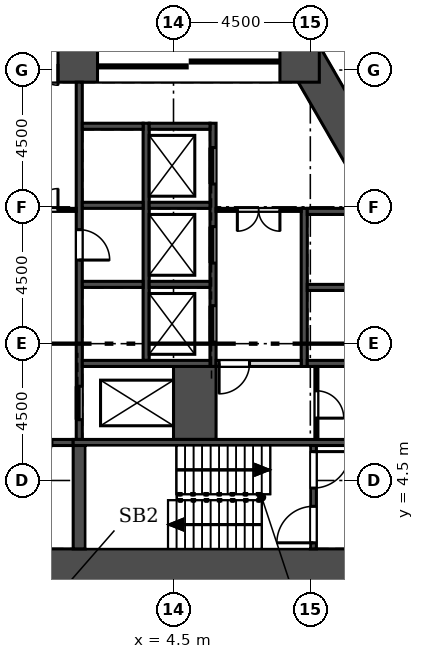
"""IFC4 building model, lengths in metres.
Left out: names, types, materials, properties, quantities, classifications, styles, units other than length and angle.
Written with IfcOpenShell. Run it as: python <this file> out.ifc"""

import sys

from ifc_helpers import new_model, si_unit, direction, frame, frame_2d, origin, place, context, subcontext, project, spatial, rectangle, extrude, element, fill, save


model = new_model("IFC4")
c1 = context("Model", 3, precision=1e-05, world=origin(), true_north=direction((0.0, 1.0)))
c2 = subcontext(c1, "Body", "Model", "MODEL_VIEW")
j1 = project(units=[si_unit("LENGTHUNIT", "METRE"), si_unit("PLANEANGLEUNIT", "RADIAN")], contexts=[c1])
p1 = place(None, origin())
s1 = spatial("IfcSite", under=j1, at=p1, CompositionType="ELEMENT")
p2 = place(p1, origin())
s2 = spatial("IfcBuilding", under=s1, at=p2, CompositionType="ELEMENT")
p3 = place(p2, frame((0.0, 0.0, 174.9)))
s3 = spatial("IfcBuildingStorey", under=s2, at=p3, CompositionType="ELEMENT", Elevation=174.9)
p4 = place(p3, frame((-13.8, 1.65, 0.0), z_axis=(0.0, 0.0, 1.0), x_axis=(1.0, 0.0, 0.0)))
e1 = element("IfcWall", 1, at=p4, inside=s3, PredefinedType="SHEAR", context=c2, shape_type="SweptSolid", body=[
    extrude(rectangle(XDim=27.6, YDim=1.2, at=frame_2d((13.8, 0.0))), origin(), (0.0, 0.0, 1.0), 7.2),
])
p5 = place(p3, frame((13.281, 10.699, 0.0), z_axis=(0.0, 0.0, 1.0), x_axis=(-0.499998513025, 0.866026262288, 0.0)))
e2 = element("IfcWall", 2, at=p5, inside=s3, PredefinedType="SHEAR", context=c2, shape_type="SweptSolid", body=[
    extrude(rectangle(XDim=9.008, YDim=1.2, at=frame_2d((4.504, 0.0))), origin(), (0.0, 0.0, 1.0), 7.2),
])
p6 = place(p3, frame((9.296, 18.2, 0.0), z_axis=(0.0, 0.0, 1.0), x_axis=(-1.0, 0.0, 0.0)))
e3 = element("IfcWall", 3, at=p6, inside=s3, PredefinedType="SHEAR", context=c2, shape_type="SweptSolid", body=[
    extrude(rectangle(XDim=18.592, YDim=1.2, at=frame_2d((9.296, 0.0))), origin(), (0.0, 0.0, 1.0), 7.2),
])
p7 = place(p6, frame((8.596, 0.0, 0.0)))
e4 = element("IfcOpeningElement", 4, at=p7, cuts=e3, PredefinedType="OPENING", context=c2, shape_type="SweptSolid", body=[
    extrude(rectangle(XDim=1.4, YDim=2.1, at=frame_2d((0.7, 1.05))), frame((0.0, 0.61, 0.0), z_axis=(0.0, -1.0, 0.0), x_axis=(1.0, 0.0, 0.0)), (0.0, 0.0, 1.0), 1.22),
])
p8 = place(p6, frame((11.296, 0.0, 0.0)))
e5 = element("IfcOpeningElement", 5, at=p8, cuts=e3, PredefinedType="OPENING", context=c2, shape_type="SweptSolid", body=[
    extrude(rectangle(XDim=6.0, YDim=2.4, at=frame_2d((3.0, 1.2))), frame((0.0, 0.61, 0.0), z_axis=(0.0, -1.0, 0.0), x_axis=(1.0, 0.0, 0.0)), (0.0, 0.0, 1.0), 1.22),
])
p9 = place(p6, frame((1.296, 0.0, 0.0)))
e6 = element("IfcOpeningElement", 6, at=p9, cuts=e3, PredefinedType="OPENING", context=c2, shape_type="SweptSolid", body=[
    extrude(rectangle(XDim=6.0, YDim=2.4, at=frame_2d((3.0, 1.2))), frame((0.0, 0.61, 0.0), z_axis=(0.0, -1.0, 0.0), x_axis=(1.0, 0.0, 0.0)), (0.0, 0.0, 1.0), 1.22),
])
p10 = place(p3, frame((28.257, 7.709, 0.0), z_axis=(0.0, 0.0, 1.0), x_axis=(-0.500002420408, 0.866024006357, 0.0)))
e7 = element("IfcWall", 7, at=p10, inside=s3, PredefinedType="SOLIDWALL", context=c2, shape_type="SweptSolid", body=[
    extrude(rectangle(XDim=47.807, YDim=0.34, at=frame_2d((23.904, 0.0))), origin(), (0.0, 0.0, 1.0), 6.8),
])
p11 = place(p10, frame((32.452, 0.0, 0.9)))
e8 = element("IfcOpeningElement", 8, at=p11, cuts=e7, PredefinedType="OPENING", context=c2, shape_type="SweptSolid", body=[
    extrude(rectangle(XDim=1.885, YDim=3.0, at=frame_2d((0.942, 1.5))), frame((0.0, 0.18, 0.0), z_axis=(0.0, -1.0, 0.0), x_axis=(1.0, 0.0, 0.0)), (0.0, 0.0, 1.0), 0.36),
])
p12 = place(p10, frame((38.452, 0.0, 0.9)))
e9 = element("IfcOpeningElement", 9, at=p12, cuts=e7, PredefinedType="OPENING", context=c2, shape_type="SweptSolid", body=[
    extrude(rectangle(XDim=1.885, YDim=3.0, at=frame_2d((0.942, 1.5))), frame((0.0, 0.18, 0.0), z_axis=(0.0, -1.0, 0.0), x_axis=(1.0, 0.0, 0.0)), (0.0, 0.0, 1.0), 0.36),
])
p13 = place(p10, frame((44.452, 0.0, 0.9)))
e10 = element("IfcOpeningElement", 10, at=p13, cuts=e7, PredefinedType="OPENING", context=c2, shape_type="SweptSolid", body=[
    extrude(rectangle(XDim=1.885, YDim=3.0, at=frame_2d((0.942, 1.5))), frame((0.0, 0.18, 0.0), z_axis=(0.0, -1.0, 0.0), x_axis=(1.0, 0.0, 0.0)), (0.0, 0.0, 1.0), 0.36),
])
p14 = place(p3, frame((8.8, 8.25, -0.4), z_axis=(0.0, 0.0, 1.0), x_axis=(0.0, 1.0, 0.0)))
e11 = element("IfcWall", 11, at=p14, inside=s3, PredefinedType="SOLIDWALL", context=c2, shape_type="SweptSolid", body=[
    extrude(rectangle(XDim=5.2, YDim=0.2, at=frame_2d((2.6, 0.0))), origin(), (0.0, 0.0, 1.0), 7.2),
])
p15 = place(p3, frame((5.8, 8.25, -0.4), z_axis=(0.0, 0.0, 1.0), x_axis=(0.0, 1.0, 0.0)))
e12 = element("IfcWall", 12, at=p15, inside=s3, PredefinedType="SOLIDWALL", context=c2, shape_type="SweptSolid", body=[
    extrude(rectangle(XDim=8.0, YDim=0.2, at=frame_2d((4.0, 0.0))), origin(), (0.0, 0.0, 1.0), 7.2),
])
p16 = place(p15, frame((0.8, 0.0, 0.4)))
e13 = element("IfcOpeningElement", 13, at=p16, cuts=e12, PredefinedType="OPENING", context=c2, shape_type="SweptSolid", body=[
    extrude(rectangle(XDim=1.2, YDim=2.1, at=frame_2d((0.6, 1.05))), frame((0.0, 0.11, 0.0), z_axis=(0.0, -1.0, 0.0), x_axis=(1.0, 0.0, 0.0)), (0.0, 0.0, 1.0), 0.22),
])
p17 = place(p15, frame((3.4, 0.0, 0.4)))
e14 = element("IfcOpeningElement", 14, at=p17, cuts=e12, PredefinedType="OPENING", context=c2, shape_type="SweptSolid", body=[
    extrude(rectangle(XDim=1.2, YDim=2.1, at=frame_2d((0.6, 1.05))), frame((0.0, 0.11, 0.0), z_axis=(0.0, -1.0, 0.0), x_axis=(1.0, 0.0, 0.0)), (0.0, 0.0, 1.0), 0.22),
])
p18 = place(p15, frame((6.0, 0.0, 0.4)))
e15 = element("IfcOpeningElement", 15, at=p18, cuts=e12, PredefinedType="OPENING", context=c2, shape_type="SweptSolid", body=[
    extrude(rectangle(XDim=1.2, YDim=2.1, at=frame_2d((0.6, 1.05))), frame((0.0, 0.11, 0.0), z_axis=(0.0, -1.0, 0.0), x_axis=(1.0, 0.0, 0.0)), (0.0, 0.0, 1.0), 0.22),
])
p19 = place(p3, frame((3.6, 8.45, -0.4), z_axis=(0.0, 0.0, 1.0), x_axis=(0.0, 1.0, 0.0)))
e16 = element("IfcWall", 16, at=p19, inside=s3, PredefinedType="SOLIDWALL", context=c2, shape_type="SweptSolid", body=[
    extrude(rectangle(XDim=7.8, YDim=0.2, at=frame_2d((3.9, 0.0))), origin(), (0.0, 0.0, 1.0), 7.2),
])
p20 = place(p3, frame((1.4, 5.85, -0.4), z_axis=(0.0, 0.0, 1.0), x_axis=(0.0, 1.0, 0.0)))
e17 = element("IfcWall", 17, at=p20, inside=s3, PredefinedType="SOLIDWALL", context=c2, shape_type="SweptSolid", body=[
    extrude(rectangle(XDim=11.75, YDim=0.2, at=frame_2d((5.875, 0.0))), origin(), (0.0, 0.0, 1.0), 7.2),
])
p21 = place(p20, frame((0.65, 0.0, 0.4)))
e18 = element("IfcOpeningElement", 18, at=p21, cuts=e17, PredefinedType="OPENING", context=c2, shape_type="SweptSolid", body=[
    extrude(rectangle(XDim=1.1, YDim=2.1, at=frame_2d((0.55, 1.05))), frame((0.0, 0.11, 0.0), z_axis=(0.0, -1.0, 0.0), x_axis=(1.0, 0.0, 0.0)), (0.0, 0.0, 1.0), 0.22),
])
p22 = place(p20, frame((5.9, 0.0, 0.4)))
e19 = element("IfcOpeningElement", 19, at=p22, cuts=e17, PredefinedType="OPENING", context=c2, shape_type="SweptSolid", body=[
    extrude(rectangle(XDim=1.0, YDim=2.1, at=frame_2d((0.5, 1.05))), frame((0.0, 0.11, 0.0), z_axis=(0.0, -1.0, 0.0), x_axis=(1.0, 0.0, 0.0)), (0.0, 0.0, 1.0), 0.22),
])
p23 = place(p3, frame((5.2, 5.85, -0.4), z_axis=(0.0, 0.0, 1.0), x_axis=(0.0, 1.0, 0.0)))
e20 = element("IfcWall", 20, at=p23, inside=s3, PredefinedType="SOLIDWALL", context=c2, shape_type="SweptSolid", body=[
    extrude(rectangle(XDim=2.4, YDim=1.4, at=frame_2d((1.2, 0.0))), origin(), (0.0, 0.0, 1.0), 7.2),
])
p24 = place(p3, frame((8.9, 8.35, -0.4), z_axis=(0.0, 0.0, 1.0), x_axis=(1.0, 0.0, 0.0)))
e21 = element("IfcWall", 21, at=p24, inside=s3, PredefinedType="SOLIDWALL", context=c2, shape_type="SweptSolid", body=[
    extrude(rectangle(XDim=2.0, YDim=0.2, at=frame_2d((1.0, 0.0))), origin(), (0.0, 0.0, 1.0), 7.2),
])
p25 = place(p3, frame((1.5, 8.35, -0.4), z_axis=(0.0, 0.0, 1.0), x_axis=(1.0, 0.0, 0.0)))
e22 = element("IfcWall", 22, at=p25, inside=s3, PredefinedType="SOLIDWALL", context=c2, shape_type="SweptSolid", body=[
    extrude(rectangle(XDim=4.2, YDim=0.2, at=frame_2d((2.1, 0.0))), origin(), (0.0, 0.0, 1.0), 7.2),
])
p26 = place(p3, frame((-1.2, 5.75, -0.4), z_axis=(0.0, 0.0, 1.0), x_axis=(1.0, 0.0, 0.0)))
e23 = element("IfcWall", 23, at=p26, inside=s3, PredefinedType="SOLIDWALL", context=c2, shape_type="SweptSolid", body=[
    extrude(rectangle(XDim=2.4, YDim=0.2, at=frame_2d((1.2, 0.0))), origin(), (0.0, 0.0, 1.0), 7.2),
])
p27 = place(p26, frame((0.7, 0.0, 0.4)))
e24 = element("IfcOpeningElement", 24, at=p27, cuts=e23, PredefinedType="OPENING", context=c2, shape_type="SweptSolid", body=[
    extrude(rectangle(XDim=1.0, YDim=2.1, at=frame_2d((0.5, 1.05))), frame((0.0, 0.11, 0.0), z_axis=(0.0, -1.0, 0.0), x_axis=(1.0, 0.0, 0.0)), (0.0, 0.0, 1.0), 0.22),
])
p28 = place(p3, frame((1.2, 5.75, -0.4), z_axis=(0.0, 0.0, 1.0), x_axis=(1.0, 0.0, 0.0)))
e25 = element("IfcWall", 25, at=p28, inside=s3, PredefinedType="SOLIDWALL", context=c2, shape_type="SweptSolid", body=[
    extrude(rectangle(XDim=11.4, YDim=0.2, at=frame_2d((5.7, 0.0))), origin(), (0.0, 0.0, 1.0), 7.2),
])
p29 = place(p3, frame((9.1, 2.25, -0.4), z_axis=(0.0, 0.0, 1.0), x_axis=(0.0, 1.0, 0.0)))
e26 = element("IfcWall", 26, at=p29, inside=s3, PredefinedType="SOLIDWALL", context=c2, shape_type="SweptSolid", body=[
    extrude(rectangle(XDim=3.4, YDim=0.2, at=frame_2d((1.7, 0.0))), origin(), (0.0, 0.0, 1.0), 7.2),
])
p30 = place(p29, frame((0.2, 0.0, 0.4)))
e27 = element("IfcOpeningElement", 27, at=p30, cuts=e26, PredefinedType="OPENING", context=c2, shape_type="SweptSolid", body=[
    extrude(rectangle(XDim=1.2, YDim=2.1, at=frame_2d((0.6, 1.05))), frame((0.0, 0.11, 0.0), z_axis=(0.0, -1.0, 0.0), x_axis=(1.0, 0.0, 0.0)), (0.0, 0.0, 1.0), 0.22),
])
p31 = place(p29, frame((2.0, 0.0, 0.4)))
e28 = element("IfcOpeningElement", 28, at=p31, cuts=e26, PredefinedType="OPENING", context=c2, shape_type="SweptSolid", body=[
    extrude(rectangle(XDim=1.2, YDim=2.1, at=frame_2d((0.6, 1.05))), frame((0.0, 0.11, 0.0), z_axis=(0.0, -1.0, 0.0), x_axis=(1.0, 0.0, 0.0)), (0.0, 0.0, 1.0), 0.22),
])
p32 = place(p3, frame((1.4, 2.25, -0.4), z_axis=(0.0, 0.0, 1.0), x_axis=(0.0, 1.0, 0.0)))
e29 = element("IfcWall", 29, at=p32, inside=s3, PredefinedType="SOLIDWALL", context=c2, shape_type="SweptSolid", body=[
    extrude(rectangle(XDim=3.4, YDim=0.4, at=frame_2d((1.7, 0.0))), origin(), (0.0, 0.0, 1.0), 7.2),
])
for number, where, z_axis, x_axis in (
    (30, (8.9, 10.85, -0.4), (0.0, 0.0, 1.0), (1.0, 0.0, 0.0)),
    (31, (8.9, 13.35, -0.4), (0.0, 0.0, 1.0), (1.0, 0.0, 0.0)),
    (32, (3.7, 10.95, -0.4), (0.0, 0.0, 1.0), (1.0, 0.0, 0.0)),
    (33, (3.7, 13.55, -0.4), (0.0, 0.0, 1.0), (1.0, 0.0, 0.0)),
    (34, (3.7, 16.15, -0.4), (0.0, 0.0, 1.0), (1.0, 0.0, 0.0)),
    (35, (1.5, 10.95, -0.4), (0.0, 0.0, 1.0), (1.0, 0.0, 0.0)),
    (36, (1.5, 13.55, -0.4), (0.0, 0.0, 1.0), (1.0, 0.0, 0.0)),
    (37, (1.5, 16.15, -0.4), (0.0, 0.0, 1.0), (1.0, 0.0, 0.0)),
):
    element("IfcWall", number, at=place(p3, frame(where, z_axis=z_axis, x_axis=x_axis)), inside=s3, PredefinedType="SOLIDWALL", context=c2, shape_type="SweptSolid", body=[
        extrude(rectangle(XDim=2.0, YDim=0.2, at=frame_2d((1.0, 0.0))), origin(), (0.0, 0.0, 1.0), 7.2),
    ])
p33 = place(p3, frame((5.9, 13.4, 0.0), z_axis=(0.0, 0.0, 1.0), x_axis=(1.0, 0.0, 0.0)))
e38 = element("IfcWall", 38, at=p33, inside=s3, PredefinedType="PARTITIONING", context=c2, shape_type="SweptSolid", body=[
    extrude(rectangle(XDim=2.8, YDim=0.1, at=frame_2d((1.4, 0.0))), origin(), (0.0, 0.0, 1.0), 6.8),
])
p34 = place(p33, frame((0.7, 0.0, 0.0)))
e39 = element("IfcOpeningElement", 39, at=p34, cuts=e38, PredefinedType="OPENING", context=c2, shape_type="SweptSolid", body=[
    extrude(rectangle(XDim=1.4, YDim=2.1, at=frame_2d((0.7, 1.05))), frame((0.0, 0.06, 0.0), z_axis=(0.0, -1.0, 0.0), x_axis=(1.0, 0.0, 0.0)), (0.0, 0.0, 1.0), 0.12),
])
p35 = place(p3, frame((9.2, 5.85, 0.0), z_axis=(0.0, 0.0, 1.0), x_axis=(0.0, 1.0, 0.0)))
e40 = element("IfcWall", 40, at=p35, inside=s3, PredefinedType="PARTITIONING", context=c2, shape_type="SweptSolid", body=[
    extrude(rectangle(XDim=2.4, YDim=0.1, at=frame_2d((1.2, 0.0))), origin(), (0.0, 0.0, 1.0), 6.8),
])
p36 = place(p35, frame((0.7, 0.0, 0.0)))
e41 = element("IfcOpeningElement", 41, at=p36, cuts=e40, PredefinedType="OPENING", context=c2, shape_type="SweptSolid", body=[
    extrude(rectangle(XDim=0.9, YDim=2.1, at=frame_2d((0.45, 1.05))), frame((0.0, 0.06, 0.0), z_axis=(0.0, -1.0, 0.0), x_axis=(1.0, 0.0, 0.0)), (0.0, 0.0, 1.0), 0.12),
])
p37 = place(p3, frame((5.9, 8.35, 0.0), z_axis=(0.0, 0.0, 1.0), x_axis=(1.0, 0.0, 0.0)))
e42 = element("IfcWall", 42, at=p37, inside=s3, PredefinedType="SOLIDWALL", context=c2, shape_type="SweptSolid", body=[
    extrude(rectangle(XDim=2.8, YDim=0.2, at=frame_2d((1.4, 0.0))), origin(), (0.0, 0.0, 1.0), 6.8),
])
p38 = place(p37, frame((0.1, 0.0, 0.0)))
e43 = element("IfcOpeningElement", 43, at=p38, cuts=e42, PredefinedType="OPENING", context=c2, shape_type="SweptSolid", body=[
    extrude(rectangle(XDim=1.0, YDim=2.1, at=frame_2d((0.5, 1.05))), frame((0.0, 0.11, 0.0), z_axis=(0.0, -1.0, 0.0), x_axis=(1.0, 0.0, 0.0)), (0.0, 0.0, 1.0), 0.22),
])
p39 = place(p3, frame((-1.3, 13.4, 0.0), z_axis=(0.0, 0.0, 1.0), x_axis=(1.0, 0.0, 0.0)))
e44 = element("IfcWall", 44, at=p39, inside=s3, PredefinedType="PARTITIONING", context=c2, shape_type="SweptSolid", body=[
    extrude(rectangle(XDim=2.6, YDim=0.1, at=frame_2d((1.3, 0.0))), origin(), (0.0, 0.0, 1.0), 6.8),
])
p40 = place(p39, frame((0.6, 0.0, 0.0)))
e45 = element("IfcOpeningElement", 45, at=p40, cuts=e44, PredefinedType="OPENING", context=c2, shape_type="SweptSolid", body=[
    extrude(rectangle(XDim=1.4, YDim=2.1, at=frame_2d((0.7, 1.05))), frame((0.0, 0.06, 0.0), z_axis=(0.0, -1.0, 0.0), x_axis=(1.0, 0.0, 0.0)), (0.0, 0.0, 1.0), 0.12),
])
p41 = place(p3, frame((7.4, 3.95, 0.0), z_axis=(0.0, 0.0, 1.0), x_axis=(1.0, 0.0, 0.0)))
e46 = element("IfcWall", 46, at=p41, inside=s3, PredefinedType="SOLIDWALL", context=c2, shape_type="SweptSolid", body=[
    extrude(rectangle(XDim=1.6, YDim=0.2, at=frame_2d((0.8, 0.0))), origin(), (0.0, 0.0, 1.0), 6.8),
])
p42 = place(p16, origin())
e47 = element("IfcDoor", 47, at=p42, inside=s3, OperationType="SLIDING_TO_LEFT", PredefinedType="DOOR", context=c2, shape_type="SweptSolid", body=[
    extrude(rectangle(XDim=1.2, YDim=2.1, at=frame_2d((0.6, 1.05))), frame((0.0, 0.025, 0.0), z_axis=(0.0, -1.0, 0.0), x_axis=(1.0, 0.0, 0.0)), (0.0, 0.0, 1.0), 0.05),
])
fill(e13, e47)
p43 = place(p17, origin())
e48 = element("IfcDoor", 48, at=p43, inside=s3, OperationType="SLIDING_TO_LEFT", PredefinedType="DOOR", context=c2, shape_type="SweptSolid", body=[
    extrude(rectangle(XDim=1.2, YDim=2.1, at=frame_2d((0.6, 1.05))), frame((0.0, 0.025, 0.0), z_axis=(0.0, -1.0, 0.0), x_axis=(1.0, 0.0, 0.0)), (0.0, 0.0, 1.0), 0.05),
])
fill(e14, e48)
p44 = place(p18, origin())
e49 = element("IfcDoor", 49, at=p44, inside=s3, OperationType="SLIDING_TO_LEFT", PredefinedType="DOOR", context=c2, shape_type="SweptSolid", body=[
    extrude(rectangle(XDim=1.2, YDim=2.1, at=frame_2d((0.6, 1.05))), frame((0.0, 0.025, 0.0), z_axis=(0.0, -1.0, 0.0), x_axis=(1.0, 0.0, 0.0)), (0.0, 0.0, 1.0), 0.05),
])
fill(e15, e49)
p45 = place(p21, origin())
e50 = element("IfcDoor", 50, at=p45, inside=s3, OperationType="SLIDING_TO_RIGHT", PredefinedType="DOOR", context=c2, shape_type="SweptSolid", body=[
    extrude(rectangle(XDim=1.1, YDim=2.1, at=frame_2d((0.55, 1.05))), frame((0.0, 0.025, 0.0), z_axis=(0.0, -1.0, 0.0), x_axis=(1.0, 0.0, 0.0)), (0.0, 0.0, 1.0), 0.05),
])
fill(e18, e50)
p46 = place(p22, frame((1.0, 0.0, 0.0), z_axis=(0.0, 0.0, 1.0), x_axis=(-1.0, 0.0, 0.0)))
e51 = element("IfcDoor", 51, at=p46, inside=s3, OperationType="SINGLE_SWING_RIGHT", PredefinedType="DOOR", context=c2, shape_type="SweptSolid", body=[
    extrude(rectangle(XDim=1.0, YDim=2.1, at=frame_2d((0.5, 1.05))), frame((0.0, 0.025, 0.0), z_axis=(0.0, -1.0, 0.0), x_axis=(1.0, 0.0, 0.0)), (0.0, 0.0, 1.0), 0.05),
])
fill(e19, e51)
p47 = place(p34, frame((1.4, 0.0, 0.0), z_axis=(0.0, 0.0, 1.0), x_axis=(-1.0, 0.0, 0.0)))
e52 = element("IfcDoor", 52, at=p47, inside=s3, OperationType="DOUBLE_DOOR_SINGLE_SWING", PredefinedType="DOOR", context=c2, shape_type="SweptSolid", body=[
    extrude(rectangle(XDim=1.4, YDim=2.1, at=frame_2d((0.7, 1.05))), frame((0.0, 0.025, 0.0), z_axis=(0.0, -1.0, 0.0), x_axis=(1.0, 0.0, 0.0)), (0.0, 0.0, 1.0), 0.05),
])
fill(e39, e52)
p48 = place(p38, frame((1.0, 0.0, 0.0), z_axis=(0.0, 0.0, 1.0), x_axis=(-1.0, 0.0, 0.0)))
e53 = element("IfcDoor", 53, at=p48, inside=s3, OperationType="SINGLE_SWING_RIGHT", PredefinedType="DOOR", context=c2, shape_type="SweptSolid", body=[
    extrude(rectangle(XDim=1.0, YDim=2.1, at=frame_2d((0.5, 1.05))), frame((0.0, 0.025, 0.0), z_axis=(0.0, -1.0, 0.0), x_axis=(1.0, 0.0, 0.0)), (0.0, 0.0, 1.0), 0.05),
])
fill(e43, e53)
p49 = place(p36, frame((0.9, 0.0, 0.0), z_axis=(0.0, 0.0, 1.0), x_axis=(-1.0, 0.0, 0.0)))
e54 = element("IfcDoor", 54, at=p49, inside=s3, OperationType="SINGLE_SWING_RIGHT", PredefinedType="DOOR", context=c2, shape_type="SweptSolid", body=[
    extrude(rectangle(XDim=0.9, YDim=2.1, at=frame_2d((0.45, 1.05))), frame((0.0, 0.025, 0.0), z_axis=(0.0, -1.0, 0.0), x_axis=(1.0, 0.0, 0.0)), (0.0, 0.0, 1.0), 0.05),
])
fill(e41, e54)
p50 = place(p30, origin())
e55 = element("IfcDoor", 55, at=p50, inside=s3, OperationType="SINGLE_SWING_LEFT", PredefinedType="DOOR", context=c2, shape_type="SweptSolid", body=[
    extrude(rectangle(XDim=1.2, YDim=2.1, at=frame_2d((0.6, 1.05))), frame((0.0, 0.025, 0.0), z_axis=(0.0, -1.0, 0.0), x_axis=(1.0, 0.0, 0.0)), (0.0, 0.0, 1.0), 0.05),
])
fill(e27, e55)
p51 = place(p40, origin())
e56 = element("IfcDoor", 56, at=p51, inside=s3, OperationType="DOUBLE_DOOR_SINGLE_SWING", PredefinedType="DOOR", context=c2, shape_type="SweptSolid", body=[
    extrude(rectangle(XDim=1.4, YDim=2.1, at=frame_2d((0.7, 1.05))), frame((0.0, 0.025, 0.0), z_axis=(0.0, -1.0, 0.0), x_axis=(1.0, 0.0, 0.0)), (0.0, 0.0, 1.0), 0.05),
])
fill(e45, e56)
p52 = place(p7, origin())
e57 = element("IfcDoor", 57, at=p52, inside=s3, OperationType="DOUBLE_DOOR_SINGLE_SWING", PredefinedType="DOOR", context=c2, shape_type="SweptSolid", body=[
    extrude(rectangle(XDim=1.4, YDim=2.1, at=frame_2d((0.7, 1.05))), frame((0.0, 0.025, 0.0), z_axis=(0.0, -1.0, 0.0), x_axis=(1.0, 0.0, 0.0)), (0.0, 0.0, 1.0), 0.05),
])
fill(e4, e57)
p53 = place(p9, origin())
e58 = element("IfcDoor", 58, at=p53, inside=s3, OperationType="DOUBLE_DOOR_SLIDING", PredefinedType="DOOR", context=c2, shape_type="SweptSolid", body=[
    extrude(rectangle(XDim=6.0, YDim=2.4, at=frame_2d((3.0, 1.2))), frame((0.0, 0.025, 0.0), z_axis=(0.0, -1.0, 0.0), x_axis=(1.0, 0.0, 0.0)), (0.0, 0.0, 1.0), 0.05),
])
fill(e6, e58)
p54 = place(p31, frame((1.2, 0.0, 0.0), z_axis=(0.0, 0.0, 1.0), x_axis=(-1.0, 0.0, 0.0)))
e59 = element("IfcDoor", 59, at=p54, inside=s3, OperationType="SINGLE_SWING_LEFT", PredefinedType="DOOR", context=c2, shape_type="SweptSolid", body=[
    extrude(rectangle(XDim=1.2, YDim=2.1, at=frame_2d((0.6, 1.05))), frame((0.0, 0.025, 0.0), z_axis=(0.0, -1.0, 0.0), x_axis=(1.0, 0.0, 0.0)), (0.0, 0.0, 1.0), 0.05),
])
fill(e28, e59)
save(model, sys.argv[1])
